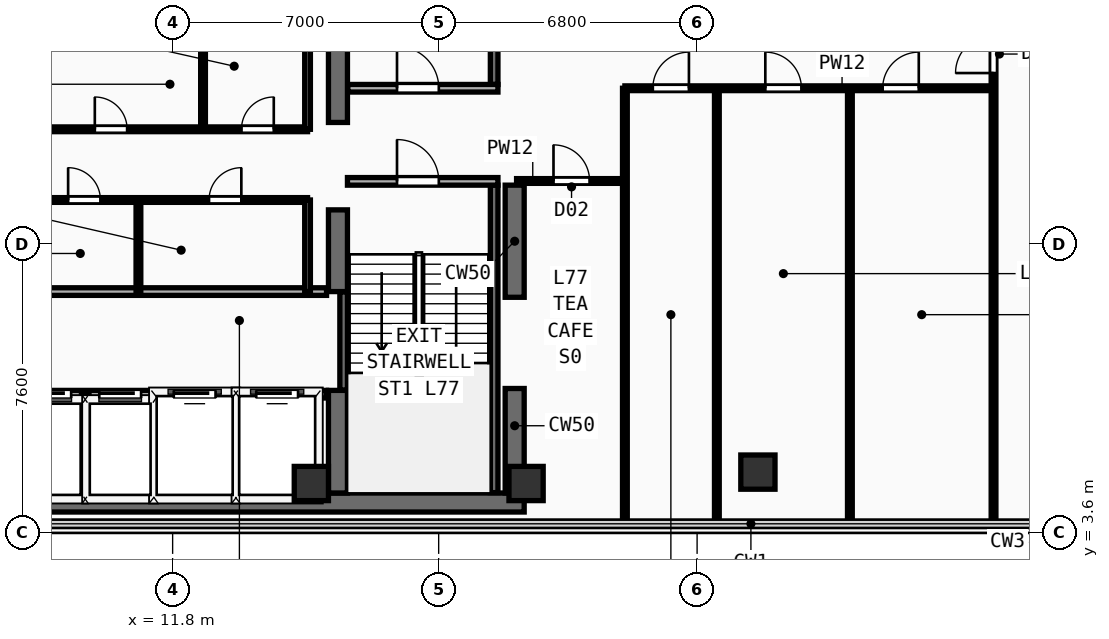
"""IFC4 building model, lengths in metres.
Left out: names, types, materials, properties, quantities, classifications, styles, units other than length and angle.
Written with IfcOpenShell. Run it as: python <this file> out.ifc"""

import sys

from ifc_helpers import new_model, si_unit, direction, frame, frame_2d, origin, origin_2d, place, context, subcontext, project, spatial, rectangle, extrude, element, fill, save


model = new_model("IFC4")
c1 = context("Model", 3, precision=1e-05, world=origin(), true_north=direction((0.0, 1.0)))
c2 = subcontext(c1, "Body", "Model", "MODEL_VIEW")
j1 = project(units=[si_unit("LENGTHUNIT", "METRE"), si_unit("PLANEANGLEUNIT", "RADIAN")], contexts=[c1])
p1 = place(None, origin())
s1 = spatial("IfcSite", under=j1, at=p1, CompositionType="ELEMENT")
p2 = place(p1, origin())
s2 = spatial("IfcBuilding", under=s1, at=p2, CompositionType="ELEMENT")
p3 = place(p2, frame((0.0, 0.0, 300.8)))
s3 = spatial("IfcBuildingStorey", under=s2, at=p3, CompositionType="ELEMENT", Elevation=300.8)
p4 = place(p3, frame((7.2, 4.4, 0.0), z_axis=(0.0, 0.0, 1.0), x_axis=(1.0, 0.0, 0.0)))
e1 = element("IfcWall", 1, at=p4, inside=s3, PredefinedType="SHEAR", context=c2, shape_type="SweptSolid", body=[
    extrude(rectangle(XDim=13.85, YDim=0.5, at=frame_2d((6.925, 0.0))), origin(), (0.0, 0.0, 1.0), 3.56),
])
p5 = place(p3, frame((20.8, 4.65, 0.0), z_axis=(0.0, 0.0, 1.0), x_axis=(0.0, 1.0, 0.0)))
e2 = element("IfcWall", 2, at=p5, inside=s3, PredefinedType="SHEAR", context=c2, shape_type="SweptSolid", body=[
    extrude(rectangle(XDim=2.75, YDim=0.5, at=frame_2d((1.375, 0.0))), origin(), (0.0, 0.0, 1.0), 3.56),
])
p6 = place(p3, frame((20.8, 9.8, 0.0), z_axis=(0.0, 0.0, 1.0), x_axis=(0.0, 1.0, 0.0)))
e3 = element("IfcWall", 3, at=p6, inside=s3, PredefinedType="SHEAR", context=c2, shape_type="SweptSolid", body=[
    extrude(rectangle(XDim=2.95, YDim=0.5, at=frame_2d((1.475, 0.0))), origin(), (0.0, 0.0, 1.0), 3.56),
])
p7 = place(p3, frame((16.15, 4.65, 0.0), z_axis=(0.0, 0.0, 1.0), x_axis=(0.0, 1.0, 0.0)))
e4 = element("IfcWall", 4, at=p7, inside=s3, PredefinedType="SHEAR", context=c2, shape_type="SweptSolid", body=[
    extrude(rectangle(XDim=2.7, YDim=0.5, at=frame_2d((1.35, 0.0))), origin(), (0.0, 0.0, 1.0), 3.56),
])
p8 = place(p3, frame((16.15, 9.95, 0.0), z_axis=(0.0, 0.0, 1.0), x_axis=(0.0, 1.0, 0.0)))
e5 = element("IfcWall", 5, at=p8, inside=s3, PredefinedType="SHEAR", context=c2, shape_type="SweptSolid", body=[
    extrude(rectangle(XDim=2.15, YDim=0.5, at=frame_2d((1.075, 0.0))), origin(), (0.0, 0.0, 1.0), 3.56),
])
p9 = place(p3, frame((16.15, 14.4, 0.0), z_axis=(0.0, 0.0, 1.0), x_axis=(0.0, 1.0, 0.0)))
e6 = element("IfcWall", 6, at=p9, inside=s3, PredefinedType="SHEAR", context=c2, shape_type="SweptSolid", body=[
    extrude(rectangle(XDim=9.1, YDim=0.5, at=frame_2d((4.55, 0.0))), origin(), (0.0, 0.0, 1.0), 3.56),
])
for number, where, z_axis, x_axis in (
    (7, (15.45, 4.9, 0.0), (0.0, 0.0, 1.0), (1.0, 0.0, 0.0)),
    (8, (21.1, 4.9, 0.0), (0.0, 0.0, 1.0), (1.0, 0.0, 0.0)),
    (9, (27.2, 5.2, 0.0), (0.0, 0.0, 1.0), (1.0, 0.0, 0.0)),
):
    element("IfcColumn", number, at=place(p3, frame(where, z_axis=z_axis, x_axis=x_axis)), inside=s3, PredefinedType="COLUMN", context=c2, shape_type="SweptSolid", body=[
        extrude(rectangle(XDim=0.9, YDim=0.9, at=origin_2d()), origin(), (0.0, 0.0, 1.0), 3.56),
    ])
p10 = place(p3, frame((16.3, 7.36, 0.0), z_axis=(0.0, 0.0, 1.0), x_axis=(0.0, 1.0, 0.0)))
e10 = element("IfcWall", 10, at=p10, inside=s3, PredefinedType="SHEAR", context=c2, shape_type="SweptSolid", body=[
    extrude(rectangle(XDim=2.58, YDim=0.2, at=frame_2d((1.29, 0.0))), origin(), (0.0, 0.0, 1.0), 3.56),
])
p11 = place(p3, frame((20.26, 4.66, 0.0), z_axis=(0.0, 0.0, 1.0), x_axis=(0.0, 1.0, 0.0)))
e11 = element("IfcWall", 11, at=p11, inside=s3, PredefinedType="SHEAR", context=c2, shape_type="SweptSolid", body=[
    extrude(rectangle(XDim=8.09, YDim=0.2, at=frame_2d((4.045, 0.0))), origin(), (0.0, 0.0, 1.0), 3.56),
])
p12 = place(p3, frame((16.4, 12.85, 0.0), z_axis=(0.0, 0.0, 1.0), x_axis=(1.0, 0.0, 0.0)))
e12 = element("IfcWall", 12, at=p12, inside=s3, PredefinedType="PARTITIONING", context=c2, shape_type="SweptSolid", body=[
    extrude(rectangle(XDim=3.96, YDim=0.2, at=frame_2d((1.98, 0.0))), origin(), (0.0, 0.0, 1.0), 3.56),
])
p13 = place(p12, frame((1.304, 0.0, 0.0)))
e13 = element("IfcOpeningElement", 13, at=p13, cuts=e12, PredefinedType="OPENING", context=c2, shape_type="SweptSolid", body=[
    extrude(rectangle(XDim=1.1, YDim=2.2, at=frame_2d((0.55, 1.1))), frame((0.0, 0.11, 0.0), z_axis=(0.0, -1.0, 0.0), x_axis=(1.0, 0.0, 0.0)), (0.0, 0.0, 1.0), 0.22),
])
p14 = place(p3, frame((20.26, 15.4, 0.0), z_axis=(0.0, 0.0, 1.0), x_axis=(0.0, 1.0, 0.0)))
e14 = element("IfcWall", 14, at=p14, inside=s3, PredefinedType="SHEAR", context=c2, shape_type="SweptSolid", body=[
    extrude(rectangle(XDim=8.09, YDim=0.2, at=frame_2d((4.045, 0.0))), origin(), (0.0, 0.0, 1.0), 3.56),
])
p15 = place(p3, frame((16.41, 15.3, 0.0), z_axis=(0.0, 0.0, 1.0), x_axis=(1.0, 0.0, 0.0)))
e15 = element("IfcWall", 15, at=p15, inside=s3, PredefinedType="PARTITIONING", context=c2, shape_type="SweptSolid", body=[
    extrude(rectangle(XDim=3.95, YDim=0.2, at=frame_2d((1.975, 0.0))), origin(), (0.0, 0.0, 1.0), 3.56),
])
p16 = place(p15, frame((1.294, 0.0, 0.0)))
e16 = element("IfcOpeningElement", 16, at=p16, cuts=e15, PredefinedType="OPENING", context=c2, shape_type="SweptSolid", body=[
    extrude(rectangle(XDim=1.1, YDim=2.2, at=frame_2d((0.55, 1.1))), frame((0.0, 0.11, 0.0), z_axis=(0.0, -1.0, 0.0), x_axis=(1.0, 0.0, 0.0)), (0.0, 0.0, 1.0), 0.22),
])
p17 = place(p3, frame((7.5, 7.25, 0.0), z_axis=(0.0, 0.0, 1.0), x_axis=(1.0, 0.0, 0.0)))
e17 = element("IfcWall", 17, at=p17, inside=s3, PredefinedType="PARTITIONING", context=c2, shape_type="SweptSolid", body=[
    extrude(rectangle(XDim=8.35, YDim=0.2, at=frame_2d((4.175, 0.0))), origin(), (0.0, 0.0, 1.0), 3.56),
])
p18 = place(p17, frame((0.53, 0.0, 0.0)))
e18 = element("IfcOpeningElement", 18, at=p18, cuts=e17, PredefinedType="OPENING", context=c2, shape_type="SweptSolid", body=[
    extrude(rectangle(XDim=1.1, YDim=2.2, at=frame_2d((0.55, 1.1))), frame((0.0, 0.11, 0.0), z_axis=(0.0, -1.0, 0.0), x_axis=(1.0, 0.0, 0.0)), (0.0, 0.0, 1.0), 0.22),
])
p19 = place(p17, frame((2.37, 0.0, 0.0)))
e19 = element("IfcOpeningElement", 19, at=p19, cuts=e17, PredefinedType="OPENING", context=c2, shape_type="SweptSolid", body=[
    extrude(rectangle(XDim=1.1, YDim=2.2, at=frame_2d((0.55, 1.1))), frame((0.0, 0.11, 0.0), z_axis=(0.0, -1.0, 0.0), x_axis=(1.0, 0.0, 0.0)), (0.0, 0.0, 1.0), 0.22),
])
p20 = place(p17, frame((4.33, 0.0, 0.0)))
e20 = element("IfcOpeningElement", 20, at=p20, cuts=e17, PredefinedType="OPENING", context=c2, shape_type="SweptSolid", body=[
    extrude(rectangle(XDim=1.1, YDim=2.2, at=frame_2d((0.55, 1.1))), frame((0.0, 0.11, 0.0), z_axis=(0.0, -1.0, 0.0), x_axis=(1.0, 0.0, 0.0)), (0.0, 0.0, 1.0), 0.22),
])
p21 = place(p17, frame((6.5, 0.0, 0.0)))
e21 = element("IfcOpeningElement", 21, at=p21, cuts=e17, PredefinedType="OPENING", context=c2, shape_type="SweptSolid", body=[
    extrude(rectangle(XDim=1.1, YDim=2.2, at=frame_2d((0.55, 1.1))), frame((0.0, 0.11, 0.0), z_axis=(0.0, -1.0, 0.0), x_axis=(1.0, 0.0, 0.0)), (0.0, 0.0, 1.0), 0.22),
])
p22 = place(p3, frame((7.5, 9.95, 0.0), z_axis=(0.0, 0.0, 1.0), x_axis=(1.0, 0.0, 0.0)))
e22 = element("IfcWall", 22, at=p22, inside=s3, PredefinedType="PARTITIONING", context=c2, shape_type="SweptSolid", body=[
    extrude(rectangle(XDim=8.35, YDim=0.2, at=frame_2d((4.175, 0.0))), origin(), (0.0, 0.0, 1.0), 3.56),
])
for number, where, z_axis, x_axis in (
    (23, (9.5, 4.45, 0.0), (0.0, 0.0, 1.0), (0.0, 1.0, 0.0)),
    (24, (11.36, 4.45, 0.0), (0.0, 0.0, 1.0), (0.0, 1.0, 0.0)),
    (25, (13.46, 4.45, 0.0), (0.0, 0.0, 1.0), (0.0, 1.0, 0.0)),
):
    element("IfcWall", number, at=place(p3, frame(where, z_axis=z_axis, x_axis=x_axis)), inside=s3, PredefinedType="PARTITIONING", context=c2, shape_type="SweptSolid", body=[
        extrude(rectangle(XDim=2.8, YDim=0.2, at=frame_2d((1.4, 0.0))), origin(), (0.0, 0.0, 1.0), 3.56),
    ])
p23 = place(p3, frame((7.5, 12.36, 0.0), z_axis=(0.0, 0.0, 1.0), x_axis=(1.0, 0.0, 0.0)))
e26 = element("IfcWall", 26, at=p23, inside=s3, PredefinedType="PARTITIONING", context=c2, shape_type="SweptSolid", body=[
    extrude(rectangle(XDim=7.85, YDim=0.125, at=frame_2d((3.925, 0.0))), origin(), (0.0, 0.0, 1.0), 3.56),
])
p24 = place(p23, frame((1.55, 0.0, 0.0)))
e27 = element("IfcOpeningElement", 27, at=p24, cuts=e26, PredefinedType="OPENING", context=c2, shape_type="SweptSolid", body=[
    extrude(rectangle(XDim=0.85, YDim=2.15, at=frame_2d((0.425, 1.075))), frame((0.0, 0.073, 0.0), z_axis=(0.0, -1.0, 0.0), x_axis=(1.0, 0.0, 0.0)), (0.0, 0.0, 1.0), 0.145),
])
p25 = place(p23, frame((5.258, 0.0, 0.0)))
e28 = element("IfcOpeningElement", 28, at=p25, cuts=e26, PredefinedType="OPENING", context=c2, shape_type="SweptSolid", body=[
    extrude(rectangle(XDim=0.85, YDim=2.15, at=frame_2d((0.425, 1.075))), frame((0.0, 0.073, 0.0), z_axis=(0.0, -1.0, 0.0), x_axis=(1.0, 0.0, 0.0)), (0.0, 0.0, 1.0), 0.145),
])
p26 = place(p3, frame((7.5, 14.22, 0.0), z_axis=(0.0, 0.0, 1.0), x_axis=(1.0, 0.0, 0.0)))
e29 = element("IfcWall", 29, at=p26, inside=s3, PredefinedType="PARTITIONING", context=c2, shape_type="SweptSolid", body=[
    extrude(rectangle(XDim=7.85, YDim=0.125, at=frame_2d((3.925, 0.0))), origin(), (0.0, 0.0, 1.0), 3.56),
])
p27 = place(p26, frame((2.252, 0.0, 0.0)))
e30 = element("IfcOpeningElement", 30, at=p27, cuts=e29, PredefinedType="OPENING", context=c2, shape_type="SweptSolid", body=[
    extrude(rectangle(XDim=0.85, YDim=2.15, at=frame_2d((0.425, 1.075))), frame((0.0, 0.073, 0.0), z_axis=(0.0, -1.0, 0.0), x_axis=(1.0, 0.0, 0.0)), (0.0, 0.0, 1.0), 0.145),
])
p28 = place(p26, frame((6.111, 0.0, 0.0)))
e31 = element("IfcOpeningElement", 31, at=p28, cuts=e29, PredefinedType="OPENING", context=c2, shape_type="SweptSolid", body=[
    extrude(rectangle(XDim=0.85, YDim=2.15, at=frame_2d((0.425, 1.075))), frame((0.0, 0.073, 0.0), z_axis=(0.0, -1.0, 0.0), x_axis=(1.0, 0.0, 0.0)), (0.0, 0.0, 1.0), 0.145),
])
p29 = place(p3, frame((15.35, 9.95, 0.0), z_axis=(0.0, 0.0, 1.0), x_axis=(0.0, 1.0, 0.0)))
e32 = element("IfcWall", 32, at=p29, inside=s3, PredefinedType="PARTITIONING", context=c2, shape_type="SweptSolid", body=[
    extrude(rectangle(XDim=2.41, YDim=0.15, at=frame_2d((1.205, 0.0))), origin(), (0.0, 0.0, 1.0), 3.56),
])
p30 = place(p3, frame((15.35, 14.22, 0.0), z_axis=(0.0, 0.0, 1.0), x_axis=(0.0, 1.0, 0.0)))
e33 = element("IfcWall", 33, at=p30, inside=s3, PredefinedType="PARTITIONING", context=c2, shape_type="SweptSolid", body=[
    extrude(rectangle(XDim=2.23, YDim=0.15, at=frame_2d((1.115, 0.0))), origin(), (0.0, 0.0, 1.0), 3.56),
])
p31 = place(p3, frame((10.9, 9.95, 0.0), z_axis=(0.0, 0.0, 1.0), x_axis=(0.0, 1.0, 0.0)))
e34 = element("IfcWall", 34, at=p31, inside=s3, PredefinedType="PARTITIONING", context=c2, shape_type="SweptSolid", body=[
    extrude(rectangle(XDim=2.41, YDim=0.125, at=frame_2d((1.205, 0.0))), origin(), (0.0, 0.0, 1.0), 3.56),
])
p32 = place(p3, frame((12.6, 14.22, 0.0), z_axis=(0.0, 0.0, 1.0), x_axis=(0.0, 1.0, 0.0)))
e35 = element("IfcWall", 35, at=p32, inside=s3, PredefinedType="PARTITIONING", context=c2, shape_type="SweptSolid", body=[
    extrude(rectangle(XDim=2.23, YDim=0.125, at=frame_2d((1.115, 0.0))), origin(), (0.0, 0.0, 1.0), 3.56),
])
p33 = place(p3, frame((20.85, 12.86, 0.0), z_axis=(0.0, 0.0, 1.0), x_axis=(1.0, 0.0, 0.0)))
e36 = element("IfcWall", 36, at=p33, inside=s3, PredefinedType="PARTITIONING", context=c2, shape_type="SweptSolid", body=[
    extrude(rectangle(XDim=2.85, YDim=0.125, at=frame_2d((1.425, 0.0))), origin(), (0.0, 0.0, 1.0), 3.56),
])
p34 = place(p33, frame((0.971, 0.0, 0.0)))
e37 = element("IfcOpeningElement", 37, at=p34, cuts=e36, PredefinedType="OPENING", context=c2, shape_type="SweptSolid", body=[
    extrude(rectangle(XDim=0.95, YDim=2.15, at=frame_2d((0.475, 1.075))), frame((0.0, 0.073, 0.0), z_axis=(0.0, -1.0, 0.0), x_axis=(1.0, 0.0, 0.0)), (0.0, 0.0, 1.0), 0.145),
])
p35 = place(p3, frame((23.7, 3.84, 0.0), z_axis=(0.0, 0.0, 1.0), x_axis=(0.0, 1.0, 0.0)))
e38 = element("IfcWall", 38, at=p35, inside=s3, PredefinedType="PARTITIONING", context=c2, shape_type="SweptSolid", body=[
    extrude(rectangle(XDim=11.46, YDim=0.125, at=frame_2d((5.73, 0.0))), origin(), (0.0, 0.0, 1.0), 3.56),
])
p36 = place(p3, frame((23.7, 15.3, 0.0), z_axis=(0.0, 0.0, 1.0), x_axis=(1.0, 0.0, 0.0)))
e39 = element("IfcWall", 39, at=p36, inside=s3, PredefinedType="PARTITIONING", context=c2, shape_type="SweptSolid", body=[
    extrude(rectangle(XDim=9.7, YDim=0.125, at=frame_2d((4.85, 0.0))), origin(), (0.0, 0.0, 1.0), 3.26),
])
p37 = place(p36, frame((0.735, 0.0, 0.0)))
e40 = element("IfcOpeningElement", 40, at=p37, cuts=e39, PredefinedType="OPENING", context=c2, shape_type="SweptSolid", body=[
    extrude(rectangle(XDim=0.95, YDim=2.15, at=frame_2d((0.475, 1.075))), frame((0.0, 0.073, 0.0), z_axis=(0.0, -1.0, 0.0), x_axis=(1.0, 0.0, 0.0)), (0.0, 0.0, 1.0), 0.145),
])
p38 = place(p36, frame((3.695, 0.0, 0.0)))
e41 = element("IfcOpeningElement", 41, at=p38, cuts=e39, PredefinedType="OPENING", context=c2, shape_type="SweptSolid", body=[
    extrude(rectangle(XDim=0.95, YDim=2.15, at=frame_2d((0.475, 1.075))), frame((0.0, 0.073, 0.0), z_axis=(0.0, -1.0, 0.0), x_axis=(1.0, 0.0, 0.0)), (0.0, 0.0, 1.0), 0.145),
])
p39 = place(p36, frame((6.783, 0.0, 0.0)))
e42 = element("IfcOpeningElement", 42, at=p39, cuts=e39, PredefinedType="OPENING", context=c2, shape_type="SweptSolid", body=[
    extrude(rectangle(XDim=0.95, YDim=2.15, at=frame_2d((0.475, 1.075))), frame((0.0, 0.073, 0.0), z_axis=(0.0, -1.0, 0.0), x_axis=(1.0, 0.0, 0.0)), (0.0, 0.0, 1.0), 0.145),
])
for number, where, z_axis, x_axis in (
    (43, (26.12, 3.84, 0.0), (0.0, 0.0, 1.0), (0.0, 1.0, 0.0)),
    (44, (29.62, 3.84, 0.0), (0.0, 0.0, 1.0), (0.0, 1.0, 0.0)),
):
    element("IfcWall", number, at=place(p3, frame(where, z_axis=z_axis, x_axis=x_axis)), inside=s3, PredefinedType="PARTITIONING", context=c2, shape_type="SweptSolid", body=[
        extrude(rectangle(XDim=11.46, YDim=0.125, at=frame_2d((5.73, 0.0))), origin(), (0.0, 0.0, 1.0), 3.56),
    ])
p40 = place(p3, frame((33.4, 3.84, 0.0), z_axis=(0.0, 0.0, 1.0), x_axis=(0.0, 1.0, 0.0)))
e45 = element("IfcWall", 45, at=p40, inside=s3, PredefinedType="PARTITIONING", context=c2, shape_type="SweptSolid", body=[
    extrude(rectangle(XDim=15.92, YDim=0.125, at=frame_2d((7.96, 0.0))), origin(), (0.0, 0.0, 1.0), 3.56),
])
p41 = place(p40, frame((11.86, 0.0, 0.0)))
e46 = element("IfcOpeningElement", 46, at=p41, cuts=e45, PredefinedType="OPENING", context=c2, shape_type="SweptSolid", body=[
    extrude(rectangle(XDim=1.0, YDim=2.2, at=frame_2d((0.5, 1.1))), frame((0.0, 0.073, 0.0), z_axis=(0.0, -1.0, 0.0), x_axis=(1.0, 0.0, 0.0)), (0.0, 0.0, 1.0), 0.145),
])
p42 = place(p13, frame((1.1, 0.0, 0.0), z_axis=(0.0, 0.0, 1.0), x_axis=(-1.0, 0.0, 0.0)))
e47 = element("IfcDoor", 47, at=p42, inside=s3, OperationType="SINGLE_SWING_RIGHT", PredefinedType="DOOR", context=c2, shape_type="SweptSolid", body=[
    extrude(rectangle(XDim=1.1, YDim=2.2, at=frame_2d((0.55, 1.1))), frame((0.0, 0.025, 0.0), z_axis=(0.0, -1.0, 0.0), x_axis=(1.0, 0.0, 0.0)), (0.0, 0.0, 1.0), 0.05),
])
fill(e13, e47)
p43 = place(p16, origin())
e48 = element("IfcDoor", 48, at=p43, inside=s3, OperationType="SINGLE_SWING_LEFT", PredefinedType="DOOR", context=c2, shape_type="SweptSolid", body=[
    extrude(rectangle(XDim=1.1, YDim=2.2, at=frame_2d((0.55, 1.1))), frame((0.0, 0.025, 0.0), z_axis=(0.0, -1.0, 0.0), x_axis=(1.0, 0.0, 0.0)), (0.0, 0.0, 1.0), 0.05),
])
fill(e16, e48)
p44 = place(p18, origin())
e49 = element("IfcDoor", 49, at=p44, inside=s3, OperationType="SLIDING_TO_LEFT", PredefinedType="DOOR", context=c2, shape_type="SweptSolid", body=[
    extrude(rectangle(XDim=1.1, YDim=2.2, at=frame_2d((0.55, 1.1))), frame((0.0, 0.025, 0.0), z_axis=(0.0, -1.0, 0.0), x_axis=(1.0, 0.0, 0.0)), (0.0, 0.0, 1.0), 0.05),
])
fill(e18, e49)
p45 = place(p19, origin())
e50 = element("IfcDoor", 50, at=p45, inside=s3, OperationType="SLIDING_TO_LEFT", PredefinedType="DOOR", context=c2, shape_type="SweptSolid", body=[
    extrude(rectangle(XDim=1.1, YDim=2.2, at=frame_2d((0.55, 1.1))), frame((0.0, 0.025, 0.0), z_axis=(0.0, -1.0, 0.0), x_axis=(1.0, 0.0, 0.0)), (0.0, 0.0, 1.0), 0.05),
])
fill(e19, e50)
p46 = place(p20, origin())
e51 = element("IfcDoor", 51, at=p46, inside=s3, OperationType="SLIDING_TO_LEFT", PredefinedType="DOOR", context=c2, shape_type="SweptSolid", body=[
    extrude(rectangle(XDim=1.1, YDim=2.2, at=frame_2d((0.55, 1.1))), frame((0.0, 0.025, 0.0), z_axis=(0.0, -1.0, 0.0), x_axis=(1.0, 0.0, 0.0)), (0.0, 0.0, 1.0), 0.05),
])
fill(e20, e51)
p47 = place(p21, origin())
e52 = element("IfcDoor", 52, at=p47, inside=s3, OperationType="SLIDING_TO_LEFT", PredefinedType="DOOR", context=c2, shape_type="SweptSolid", body=[
    extrude(rectangle(XDim=1.1, YDim=2.2, at=frame_2d((0.55, 1.1))), frame((0.0, 0.025, 0.0), z_axis=(0.0, -1.0, 0.0), x_axis=(1.0, 0.0, 0.0)), (0.0, 0.0, 1.0), 0.05),
])
fill(e21, e52)
p48 = place(p24, origin())
e53 = element("IfcDoor", 53, at=p48, inside=s3, OperationType="SINGLE_SWING_LEFT", PredefinedType="DOOR", context=c2, shape_type="SweptSolid", body=[
    extrude(rectangle(XDim=0.85, YDim=2.15, at=frame_2d((0.425, 1.075))), frame((0.0, 0.025, 0.0), z_axis=(0.0, -1.0, 0.0), x_axis=(1.0, 0.0, 0.0)), (0.0, 0.0, 1.0), 0.05),
])
fill(e27, e53)
p49 = place(p25, origin())
e54 = element("IfcDoor", 54, at=p49, inside=s3, OperationType="SINGLE_SWING_RIGHT", PredefinedType="DOOR", context=c2, shape_type="SweptSolid", body=[
    extrude(rectangle(XDim=0.85, YDim=2.15, at=frame_2d((0.425, 1.075))), frame((0.0, 0.025, 0.0), z_axis=(0.0, -1.0, 0.0), x_axis=(1.0, 0.0, 0.0)), (0.0, 0.0, 1.0), 0.05),
])
fill(e28, e54)
p50 = place(p27, origin())
e55 = element("IfcDoor", 55, at=p50, inside=s3, OperationType="SINGLE_SWING_LEFT", PredefinedType="DOOR", context=c2, shape_type="SweptSolid", body=[
    extrude(rectangle(XDim=0.85, YDim=2.15, at=frame_2d((0.425, 1.075))), frame((0.0, 0.025, 0.0), z_axis=(0.0, -1.0, 0.0), x_axis=(1.0, 0.0, 0.0)), (0.0, 0.0, 1.0), 0.05),
])
fill(e30, e55)
p51 = place(p28, origin())
e56 = element("IfcDoor", 56, at=p51, inside=s3, OperationType="SINGLE_SWING_RIGHT", PredefinedType="DOOR", context=c2, shape_type="SweptSolid", body=[
    extrude(rectangle(XDim=0.85, YDim=2.15, at=frame_2d((0.425, 1.075))), frame((0.0, 0.025, 0.0), z_axis=(0.0, -1.0, 0.0), x_axis=(1.0, 0.0, 0.0)), (0.0, 0.0, 1.0), 0.05),
])
fill(e31, e56)
p52 = place(p34, origin())
e57 = element("IfcDoor", 57, at=p52, inside=s3, OperationType="SINGLE_SWING_LEFT", PredefinedType="DOOR", context=c2, shape_type="SweptSolid", body=[
    extrude(rectangle(XDim=0.95, YDim=2.15, at=frame_2d((0.475, 1.075))), frame((0.0, 0.025, 0.0), z_axis=(0.0, -1.0, 0.0), x_axis=(1.0, 0.0, 0.0)), (0.0, 0.0, 1.0), 0.05),
])
fill(e37, e57)
p53 = place(p37, origin())
e58 = element("IfcDoor", 58, at=p53, inside=s3, OperationType="SINGLE_SWING_RIGHT", PredefinedType="DOOR", context=c2, shape_type="SweptSolid", body=[
    extrude(rectangle(XDim=0.95, YDim=2.15, at=frame_2d((0.475, 1.075))), frame((0.0, 0.025, 0.0), z_axis=(0.0, -1.0, 0.0), x_axis=(1.0, 0.0, 0.0)), (0.0, 0.0, 1.0), 0.05),
])
fill(e40, e58)
p54 = place(p38, origin())
e59 = element("IfcDoor", 59, at=p54, inside=s3, OperationType="SINGLE_SWING_LEFT", PredefinedType="DOOR", context=c2, shape_type="SweptSolid", body=[
    extrude(rectangle(XDim=0.95, YDim=2.15, at=frame_2d((0.475, 1.075))), frame((0.0, 0.025, 0.0), z_axis=(0.0, -1.0, 0.0), x_axis=(1.0, 0.0, 0.0)), (0.0, 0.0, 1.0), 0.05),
])
fill(e41, e59)
p55 = place(p39, origin())
e60 = element("IfcDoor", 60, at=p55, inside=s3, OperationType="SINGLE_SWING_RIGHT", PredefinedType="DOOR", context=c2, shape_type="SweptSolid", body=[
    extrude(rectangle(XDim=0.95, YDim=2.15, at=frame_2d((0.475, 1.075))), frame((0.0, 0.025, 0.0), z_axis=(0.0, -1.0, 0.0), x_axis=(1.0, 0.0, 0.0)), (0.0, 0.0, 1.0), 0.05),
])
fill(e42, e60)
p56 = place(p41, origin())
e61 = element("IfcDoor", 61, at=p56, inside=s3, OperationType="SINGLE_SWING_LEFT", PredefinedType="DOOR", context=c2, shape_type="SweptSolid", body=[
    extrude(rectangle(XDim=1.0, YDim=2.2, at=frame_2d((0.5, 1.1))), frame((0.0, 0.025, 0.0), z_axis=(0.0, -1.0, 0.0), x_axis=(1.0, 0.0, 0.0)), (0.0, 0.0, 1.0), 0.05),
])
fill(e46, e61)
save(model, sys.argv[1])
